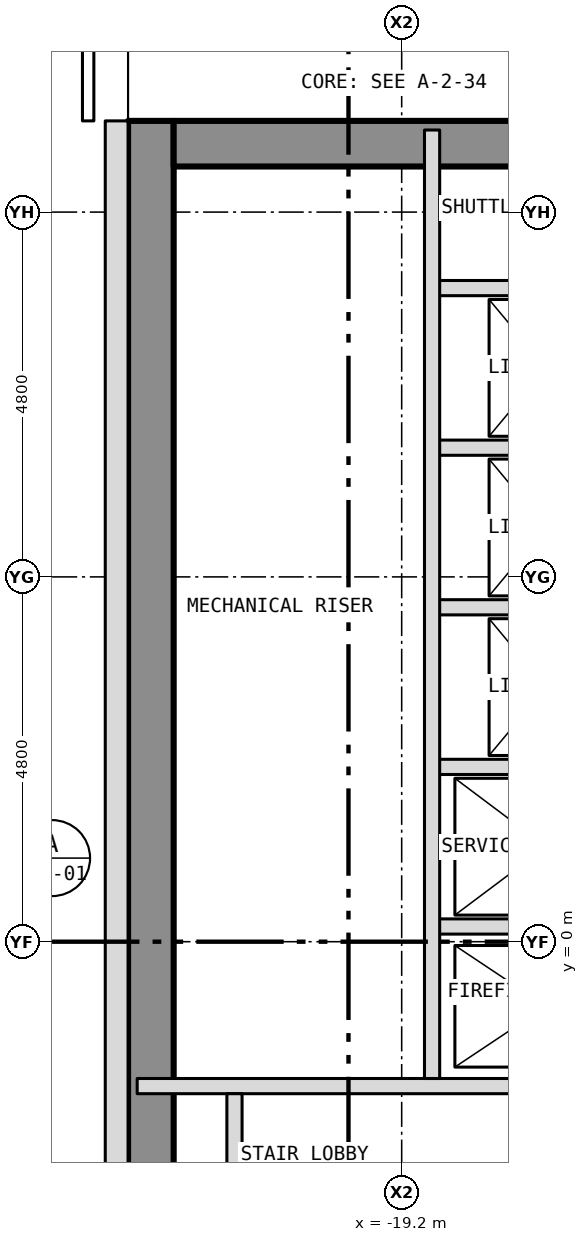
"""IFC4 building model, lengths in metres.
Left out: names, types, materials, properties, quantities, classifications, styles, units other than length and angle.
Written with IfcOpenShell. Run it as: python <this file> out.ifc"""

import sys

from ifc_helpers import new_model, si_unit, direction, frame, frame_2d, origin, place, context, subcontext, project, spatial, rectangle, extrude, element, save


model = new_model("IFC4")
c1 = context("Model", 3, precision=1e-05, world=origin(), true_north=direction((0.0, 1.0)))
c2 = subcontext(c1, "Body", "Model", "MODEL_VIEW")
j1 = project(units=[si_unit("LENGTHUNIT", "METRE"), si_unit("PLANEANGLEUNIT", "RADIAN")], contexts=[c1])
p1 = place(None, origin())
s1 = spatial("IfcSite", under=j1, at=p1, CompositionType="ELEMENT")
p2 = place(p1, origin())
s2 = spatial("IfcBuilding", under=s1, at=p2, CompositionType="ELEMENT")
p3 = place(p2, frame((0.0, 0.0, 124.0)))
s3 = spatial("IfcBuildingStorey", under=s2, at=p3, CompositionType="ELEMENT", Elevation=124.0)
p4 = place(p3, frame((-22.5, -10.8, 0.0), z_axis=(0.0, 0.0, 1.0), x_axis=(0.0, 1.0, 0.0)))
e1 = element("IfcWall", 1, at=p4, inside=s3, PredefinedType="SHEAR", context=c2, shape_type="SweptSolid", body=[
    extrude(rectangle(XDim=21.6, YDim=0.6, at=frame_2d((10.8, 0.0))), origin(), (0.0, 0.0, 1.0), 3.25),
])
p5 = place(p3, frame((-22.2, 10.5, 0.0), z_axis=(0.0, 0.0, 1.0), x_axis=(1.0, 0.0, 0.0)))
e2 = element("IfcWall", 2, at=p5, inside=s3, PredefinedType="SHEAR", context=c2, shape_type="SweptSolid", body=[
    extrude(rectangle(XDim=5.8, YDim=0.6, at=frame_2d((2.9, 0.0))), origin(), (0.0, 0.0, 1.0), 3.25),
])
p6 = place(p3, frame((-22.95, 10.8, 0.0), z_axis=(0.0, 0.0, 1.0), x_axis=(0.0, -1.0, 0.0)))
e3 = element("IfcWall", 3, at=p6, inside=s3, PredefinedType="SOLIDWALL", context=c2, shape_type="SweptSolid", body=[
    extrude(rectangle(XDim=21.6, YDim=0.3, at=frame_2d((10.8, 0.0))), origin(), (0.0, 0.0, 1.0), 3.5),
])
p7 = place(p6, frame((18.05, 0.0, 1.0)))
e4 = element("IfcOpeningElement", 4, at=p7, cuts=e3, PredefinedType="OPENING", context=c2, shape_type="SweptSolid", body=[
    extrude(rectangle(XDim=0.6, YDim=1.5, at=frame_2d((0.3, 0.75))), frame((0.0, 0.162, 0.0), z_axis=(0.0, -1.0, 0.0), x_axis=(1.0, 0.0, 0.0)), (0.0, 0.0, 1.0), 0.324),
])
p8 = place(p3, frame((-22.68, -1.9, 0.0), z_axis=(0.0, 0.0, 1.0), x_axis=(1.0, 0.0, 0.0)))
e5 = element("IfcWall", 5, at=p8, inside=s3, PredefinedType="PARTITIONING", context=c2, shape_type="SweptSolid", body=[
    extrude(rectangle(XDim=6.76, YDim=0.2, at=frame_2d((3.38, 0.0))), origin(), (0.0, 0.0, 1.0), 3.25),
])
for number, where, z_axis, x_axis in (
    (6, (-18.8, 0.2, 0.0), (0.0, 0.0, 1.0), (1.0, 0.0, 0.0)),
    (7, (-18.8, 2.3, 0.0), (0.0, 0.0, 1.0), (1.0, 0.0, 0.0)),
    (8, (-18.8, 4.4, 0.0), (0.0, 0.0, 1.0), (1.0, 0.0, 0.0)),
    (9, (-18.8, 6.5, 0.0), (0.0, 0.0, 1.0), (1.0, 0.0, 0.0)),
    (10, (-18.8, 8.6, 0.0), (0.0, 0.0, 1.0), (1.0, 0.0, 0.0)),
):
    element("IfcWall", number, at=place(p3, frame(where, z_axis=z_axis, x_axis=x_axis)), inside=s3, PredefinedType="PARTITIONING", context=c2, shape_type="SweptSolid", body=[
        extrude(rectangle(XDim=2.88, YDim=0.2, at=frame_2d((1.44, 0.0))), origin(), (0.0, 0.0, 1.0), 3.25),
    ])
p9 = place(p3, frame((-21.4, -10.68, 0.0), z_axis=(0.0, 0.0, 1.0), x_axis=(0.0, 1.0, 0.0)))
e11 = element("IfcWall", 11, at=p9, inside=s3, PredefinedType="PARTITIONING", context=c2, shape_type="SweptSolid", body=[
    extrude(rectangle(XDim=8.68, YDim=0.2, at=frame_2d((4.34, 0.0))), origin(), (0.0, 0.0, 1.0), 3.25),
])
p10 = place(p9, frame((3.88, 0.0, 0.0)))
e12 = element("IfcOpeningElement", 12, at=p10, cuts=e11, PredefinedType="OPENING", context=c2, shape_type="SweptSolid", body=[
    extrude(rectangle(XDim=0.9, YDim=2.1, at=frame_2d((0.45, 1.05))), frame((0.0, 0.112, 0.0), z_axis=(0.0, -1.0, 0.0), x_axis=(1.0, 0.0, 0.0)), (0.0, 0.0, 1.0), 0.224),
])
p11 = place(p3, frame((-18.8, -1.8, 0.0), z_axis=(0.0, 0.0, 1.0), x_axis=(0.0, 1.0, 0.0)))
e13 = element("IfcWall", 13, at=p11, inside=s3, PredefinedType="PARTITIONING", context=c2, shape_type="SweptSolid", body=[
    extrude(rectangle(XDim=12.48, YDim=0.2, at=frame_2d((6.24, 0.0))), origin(), (0.0, 0.0, 1.0), 3.25),
])
save(model, sys.argv[1])
